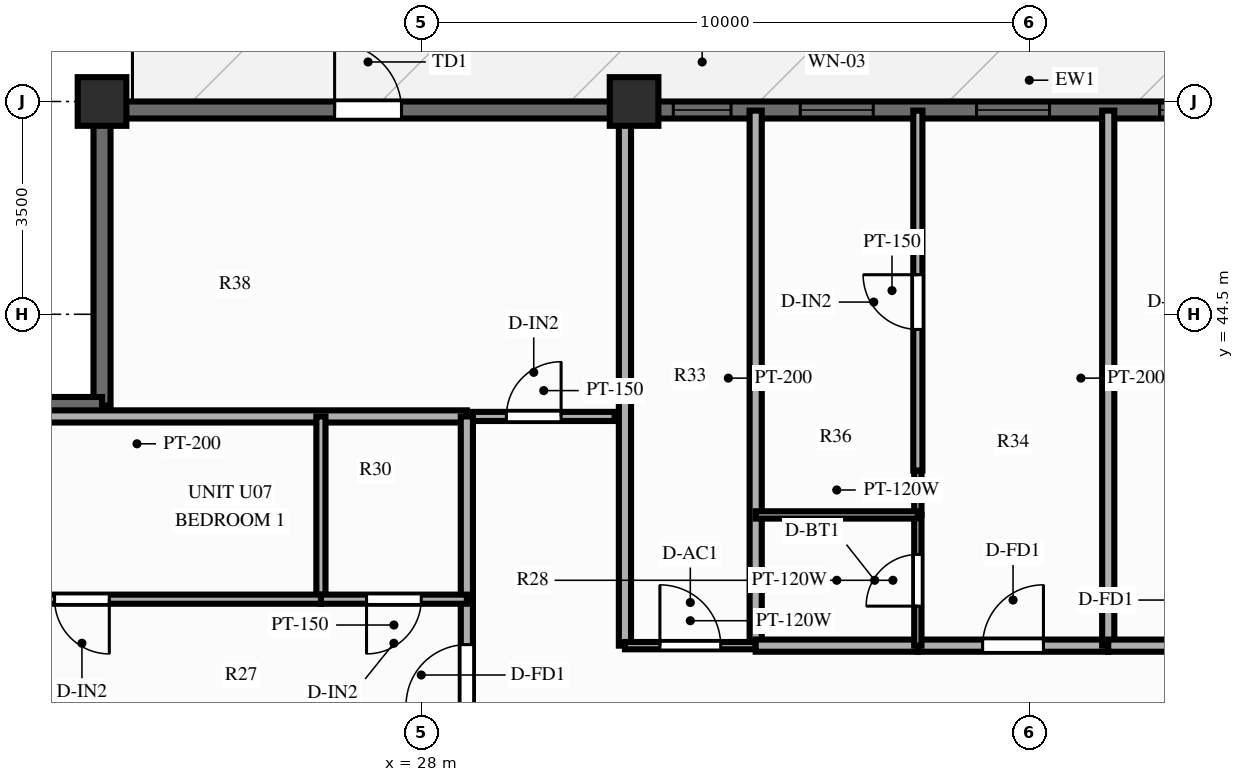
"""IFC4 building model, lengths in metres.
Left out: names, types, materials, properties, quantities, classifications, styles, units other than length and angle.
Written with IfcOpenShell. Run it as: python <this file> out.ifc"""

import sys

from ifc_helpers import new_model, si_unit, direction, frame, frame_2d, origin, origin_2d, place, context, subcontext, project, spatial, rectangle, extrude, source, transform, mapped, element, fill, save


model = new_model("IFC4")
c1 = context("Model", 3, precision=1e-05, world=origin(), true_north=direction((0.0, 1.0)))
c2 = subcontext(c1, "Body", "Model", "MODEL_VIEW")
j1 = project(units=[si_unit("LENGTHUNIT", "METRE"), si_unit("PLANEANGLEUNIT", "RADIAN")], contexts=[c1])
p1 = place(None, origin())
s1 = spatial("IfcSite", under=j1, at=p1, CompositionType="ELEMENT")
p2 = place(p1, origin())
s2 = spatial("IfcBuilding", under=s1, at=p2, CompositionType="ELEMENT")
p3 = place(p2, frame((0.0, 0.0, 189.7)))
s3 = spatial("IfcBuildingStorey", under=s2, at=p3, CompositionType="ELEMENT", Elevation=189.7)
m1 = source(origin(), c2, "Body", "SweptSolid", [
    extrude(rectangle(XDim=0.8, YDim=0.8, at=origin_2d()), origin(), (0.0, 0.0, 1.0), 3.0),
])
for number, where, z_axis, x_axis in (
    (1, (31.5, 48.0, 0.0), (0.0, 0.0, 1.0), (1.0, 0.0, 0.0)),
    (2, (22.75, 48.0, 0.0), (0.0, 0.0, 1.0), (1.0, 0.0, 0.0)),
):
    element("IfcColumn", number, at=place(p3, frame(where, z_axis=z_axis, x_axis=x_axis)), inside=s3, PredefinedType="COLUMN", context=c2, shape_type="MappedRepresentation", body=[
        mapped(m1, transform((0.0, 0.0, 0.0), scale=1.0)),
    ])
p4 = place(p3, frame((22.75, 47.86, 0.0), z_axis=(0.0, 0.0, 1.0), x_axis=(1.0, 0.0, 0.0)))
e3 = element("IfcWall", 3, at=p4, inside=s3, PredefinedType="SOLIDWALL", context=c2, shape_type="SweptSolid", body=[
    extrude(rectangle(XDim=30.5, YDim=0.28, at=frame_2d((15.25, 0.0))), origin(), (0.0, 0.0, 1.0), 2.28),
])
p5 = place(p4, frame((3.825, 0.0, 0.0)))
e4 = element("IfcOpeningElement", 4, at=p5, cuts=e3, PredefinedType="OPENING", context=c2, shape_type="SweptSolid", body=[
    extrude(rectangle(XDim=1.1, YDim=2.15, at=frame_2d((0.55, 1.075))), frame((0.0, 0.152, 0.0), z_axis=(0.0, -1.0, 0.0), x_axis=(1.0, 0.0, 0.0)), (0.0, 0.0, 1.0), 0.304),
])
p6 = place(p4, frame((9.395, 0.0, 0.25)))
e5 = element("IfcOpeningElement", 5, at=p6, cuts=e3, PredefinedType="OPENING", context=c2, shape_type="SweptSolid", body=[
    extrude(rectangle(XDim=0.95, YDim=1.5, at=frame_2d((0.475, 0.75))), frame((0.0, 0.152, 0.0), z_axis=(0.0, -1.0, 0.0), x_axis=(1.0, 0.0, 0.0)), (0.0, 0.0, 1.0), 0.304),
])
p7 = place(p4, frame((11.483, 0.0, 0.25)))
e6 = element("IfcOpeningElement", 6, at=p7, cuts=e3, PredefinedType="OPENING", context=c2, shape_type="SweptSolid", body=[
    extrude(rectangle(XDim=1.2, YDim=1.5, at=frame_2d((0.6, 0.75))), frame((0.0, 0.152, 0.0), z_axis=(0.0, -1.0, 0.0), x_axis=(1.0, 0.0, 0.0)), (0.0, 0.0, 1.0), 0.304),
])
p8 = place(p4, frame((14.383, 0.0, 0.25)))
e7 = element("IfcOpeningElement", 7, at=p8, cuts=e3, PredefinedType="OPENING", context=c2, shape_type="SweptSolid", body=[
    extrude(rectangle(XDim=1.2, YDim=1.5, at=frame_2d((0.6, 0.75))), frame((0.0, 0.152, 0.0), z_axis=(0.0, -1.0, 0.0), x_axis=(1.0, 0.0, 0.0)), (0.0, 0.0, 1.0), 0.304),
])
p9 = place(p4, frame((17.393, 0.0, 0.25)))
e8 = element("IfcOpeningElement", 8, at=p9, cuts=e3, PredefinedType="OPENING", context=c2, shape_type="SweptSolid", body=[
    extrude(rectangle(XDim=1.2, YDim=1.5, at=frame_2d((0.6, 0.75))), frame((0.0, 0.152, 0.0), z_axis=(0.0, -1.0, 0.0), x_axis=(1.0, 0.0, 0.0)), (0.0, 0.0, 1.0), 0.304),
])
p10 = place(p4, frame((19.874, 0.0, 0.25)))
e9 = element("IfcOpeningElement", 9, at=p10, cuts=e3, PredefinedType="OPENING", context=c2, shape_type="SweptSolid", body=[
    extrude(rectangle(XDim=1.2, YDim=1.5, at=frame_2d((0.6, 0.75))), frame((0.0, 0.152, 0.0), z_axis=(0.0, -1.0, 0.0), x_axis=(1.0, 0.0, 0.0)), (0.0, 0.0, 1.0), 0.304),
])
p11 = place(p4, frame((25.525, 0.0, 0.25)))
e10 = element("IfcOpeningElement", 10, at=p11, cuts=e3, PredefinedType="OPENING", context=c2, shape_type="SweptSolid", body=[
    extrude(rectangle(XDim=1.2, YDim=1.5, at=frame_2d((0.6, 0.75))), frame((0.0, 0.152, 0.0), z_axis=(0.0, -1.0, 0.0), x_axis=(1.0, 0.0, 0.0)), (0.0, 0.0, 1.0), 0.304),
])
for number, where, z_axis, x_axis in (
    (11, (22.75, 43.0, 0.0), (0.0, 0.0, 1.0), (0.0, 1.0, 0.0)),
    (12, (17.83, 43.0, 0.0), (0.0, 0.0, 1.0), (1.0, 0.0, 0.0)),
):
    element("IfcWall", number, at=place(p3, frame(where, z_axis=z_axis, x_axis=x_axis)), inside=s3, PredefinedType="SOLIDWALL", context=c2, shape_type="SweptSolid", body=[
        extrude(rectangle(XDim=4.92, YDim=0.28, at=frame_2d((2.46, 0.0))), origin(), (0.0, 0.0, 1.0), 2.28),
    ])
p12 = place(p3, frame((28.85, 42.82, 0.0), z_axis=(0.0, 0.0, 1.0), x_axis=(1.0, 0.0, 0.0)))
e13 = element("IfcWall", 13, at=p12, inside=s3, PredefinedType="PARTITIONING", context=c2, shape_type="SweptSolid", body=[
    extrude(rectangle(XDim=2.33, YDim=0.15, at=frame_2d((1.165, 0.0))), origin(), (0.0, 0.0, 1.0), 2.79),
])
p13 = place(p12, frame((0.55, 0.0, 0.0)))
e14 = element("IfcOpeningElement", 14, at=p13, cuts=e13, PredefinedType="OPENING", context=c2, shape_type="SweptSolid", body=[
    extrude(rectangle(XDim=0.9, YDim=2.1, at=frame_2d((0.45, 1.05))), frame((0.0, 0.087, 0.0), z_axis=(0.0, -1.0, 0.0), x_axis=(1.0, 0.0, 0.0)), (0.0, 0.0, 1.0), 0.174),
])
p14 = place(p3, frame((31.35, 39.05, 0.0), z_axis=(0.0, 0.0, 1.0), x_axis=(0.0, 1.0, 0.0)))
e15 = element("IfcWall", 15, at=p14, inside=s3, PredefinedType="PARTITIONING", context=c2, shape_type="SweptSolid", body=[
    extrude(rectangle(XDim=8.8, YDim=0.2, at=frame_2d((4.4, 0.0))), origin(), (0.0, 0.0, 1.0), 2.39),
])
p15 = place(p3, frame((33.5, 39.05, 0.0), z_axis=(0.0, 0.0, 1.0), x_axis=(0.0, 1.0, 0.0)))
e16 = element("IfcWall", 16, at=p15, inside=s3, PredefinedType="PARTITIONING", context=c2, shape_type="SweptSolid", body=[
    extrude(rectangle(XDim=8.8, YDim=0.2, at=frame_2d((4.4, 0.0))), origin(), (0.0, 0.0, 1.0), 2.79),
])
p16 = place(p3, frame((31.35, 39.05, 0.0), z_axis=(0.0, 0.0, 1.0), x_axis=(1.0, 0.0, 0.0)))
e17 = element("IfcWall", 17, at=p16, inside=s3, PredefinedType="PARTITIONING", context=c2, shape_type="SweptSolid", body=[
    extrude(rectangle(XDim=2.15, YDim=0.12, at=frame_2d((1.075, 0.0))), origin(), (0.0, 0.0, 1.0), 2.79),
])
p17 = place(p16, frame((0.575, 0.0, 0.0)))
e18 = element("IfcOpeningElement", 18, at=p17, cuts=e17, PredefinedType="OPENING", context=c2, shape_type="SweptSolid", body=[
    extrude(rectangle(XDim=1.0, YDim=2.1, at=frame_2d((0.5, 1.05))), frame((0.0, 0.072, 0.0), z_axis=(0.0, -1.0, 0.0), x_axis=(1.0, 0.0, 0.0)), (0.0, 0.0, 1.0), 0.144),
])
p18 = place(p3, frame((33.5, 39.05, 0.0), z_axis=(0.0, 0.0, 1.0), x_axis=(1.0, 0.0, 0.0)))
e19 = element("IfcWall", 19, at=p18, inside=s3, PredefinedType="PARTITIONING", context=c2, shape_type="SweptSolid", body=[
    extrude(rectangle(XDim=2.667, YDim=0.2, at=frame_2d((1.333, 0.0))), origin(), (0.0, 0.0, 1.0), 2.79),
])
p19 = place(p3, frame((36.167, 39.05, 0.0), z_axis=(0.0, 0.0, 1.0), x_axis=(1.0, 0.0, 0.0)))
e20 = element("IfcWall", 20, at=p19, inside=s3, PredefinedType="PARTITIONING", context=c2, shape_type="SweptSolid", body=[
    extrude(rectangle(XDim=3.131, YDim=0.2, at=frame_2d((1.565, 0.0))), origin(), (0.0, 0.0, 1.0), 2.79),
])
p20 = place(p19, frame((1.065, 0.0, 0.0)))
e21 = element("IfcOpeningElement", 21, at=p20, cuts=e20, PredefinedType="OPENING", context=c2, shape_type="SweptSolid", body=[
    extrude(rectangle(XDim=1.0, YDim=2.15, at=frame_2d((0.5, 1.075))), frame((0.0, 0.112, 0.0), z_axis=(0.0, -1.0, 0.0), x_axis=(1.0, 0.0, 0.0)), (0.0, 0.0, 1.0), 0.224),
])
p21 = place(p3, frame((36.167, 39.05, 0.0), z_axis=(0.0, 0.0, 1.0), x_axis=(0.0, 1.0, 0.0)))
e22 = element("IfcWall", 22, at=p21, inside=s3, PredefinedType="PARTITIONING", context=c2, shape_type="SweptSolid", body=[
    extrude(rectangle(XDim=2.15, YDim=0.12, at=frame_2d((1.075, 0.0))), origin(), (0.0, 0.0, 1.0), 2.79),
])
p22 = place(p21, frame((0.65, 0.0, 0.0)))
e23 = element("IfcOpeningElement", 23, at=p22, cuts=e22, PredefinedType="OPENING", context=c2, shape_type="SweptSolid", body=[
    extrude(rectangle(XDim=0.85, YDim=2.05, at=frame_2d((0.425, 1.025))), frame((0.0, 0.072, 0.0), z_axis=(0.0, -1.0, 0.0), x_axis=(1.0, 0.0, 0.0)), (0.0, 0.0, 1.0), 0.144),
])
p23 = place(p3, frame((36.167, 41.2, 0.0), z_axis=(0.0, 0.0, 1.0), x_axis=(0.0, 1.0, 0.0)))
e24 = element("IfcWall", 24, at=p23, inside=s3, PredefinedType="PARTITIONING", context=c2, shape_type="SweptSolid", body=[
    extrude(rectangle(XDim=0.73, YDim=0.12, at=frame_2d((0.365, 0.0))), origin(), (0.0, 0.0, 1.0), 2.79),
])
p24 = place(p3, frame((33.5, 41.2, 0.0), z_axis=(0.0, 0.0, 1.0), x_axis=(1.0, 0.0, 0.0)))
e25 = element("IfcWall", 25, at=p24, inside=s3, PredefinedType="PARTITIONING", context=c2, shape_type="SweptSolid", body=[
    extrude(rectangle(XDim=2.667, YDim=0.12, at=frame_2d((1.333, 0.0))), origin(), (0.0, 0.0, 1.0), 2.79),
])
p25 = place(p3, frame((36.167, 41.93, 0.0), z_axis=(0.0, 0.0, 1.0), x_axis=(0.0, 1.0, 0.0)))
e26 = element("IfcWall", 26, at=p25, inside=s3, PredefinedType="PARTITIONING", context=c2, shape_type="SweptSolid", body=[
    extrude(rectangle(XDim=5.92, YDim=0.15, at=frame_2d((2.96, 0.0))), origin(), (0.0, 0.0, 1.0), 2.79),
])
p26 = place(p25, frame((2.321, 0.0, 0.0)))
e27 = element("IfcOpeningElement", 27, at=p26, cuts=e26, PredefinedType="OPENING", context=c2, shape_type="SweptSolid", body=[
    extrude(rectangle(XDim=0.9, YDim=2.1, at=frame_2d((0.45, 1.05))), frame((0.0, 0.087, 0.0), z_axis=(0.0, -1.0, 0.0), x_axis=(1.0, 0.0, 0.0)), (0.0, 0.0, 1.0), 0.174),
])
p27 = place(p3, frame((39.298, 39.05, 0.0), z_axis=(0.0, 0.0, 1.0), x_axis=(0.0, 1.0, 0.0)))
e28 = element("IfcWall", 28, at=p27, inside=s3, PredefinedType="PARTITIONING", context=c2, shape_type="SweptSolid", body=[
    extrude(rectangle(XDim=8.8, YDim=0.2, at=frame_2d((4.4, 0.0))), origin(), (0.0, 0.0, 1.0), 2.79),
])
p28 = place(p3, frame((39.298, 39.05, 0.0), z_axis=(0.0, 0.0, 1.0), x_axis=(1.0, 0.0, 0.0)))
e29 = element("IfcWall", 29, at=p28, inside=s3, PredefinedType="PARTITIONING", context=c2, shape_type="SweptSolid", body=[
    extrude(rectangle(XDim=2.89, YDim=0.2, at=frame_2d((1.445, 0.0))), origin(), (0.0, 0.0, 1.0), 2.79),
])
p29 = place(p28, frame((0.945, 0.0, 0.0)))
e30 = element("IfcOpeningElement", 30, at=p29, cuts=e29, PredefinedType="OPENING", context=c2, shape_type="SweptSolid", body=[
    extrude(rectangle(XDim=1.0, YDim=2.15, at=frame_2d((0.5, 1.075))), frame((0.0, 0.112, 0.0), z_axis=(0.0, -1.0, 0.0), x_axis=(1.0, 0.0, 0.0)), (0.0, 0.0, 1.0), 0.224),
])
p30 = place(p3, frame((28.75, 42.82, 0.0), z_axis=(0.0, 0.0, 1.0), x_axis=(-1.0, 0.0, 0.0)))
e31 = element("IfcWall", 31, at=p30, inside=s3, PredefinedType="PARTITIONING", context=c2, shape_type="SweptSolid", body=[
    extrude(rectangle(XDim=10.85, YDim=0.2, at=frame_2d((5.425, 0.0))), origin(), (0.0, 0.0, 1.0), 2.79),
])
p31 = place(p3, frame((28.75, 37.32, 0.0), z_axis=(0.0, 0.0, 1.0), x_axis=(0.0, 1.0, 0.0)))
e32 = element("IfcWall", 32, at=p31, inside=s3, PredefinedType="PARTITIONING", context=c2, shape_type="SweptSolid", body=[
    extrude(rectangle(XDim=2.494, YDim=0.2, at=frame_2d((1.247, 0.0))), origin(), (0.0, 0.0, 1.0), 2.79),
])
p32 = place(p31, frame((0.747, 0.0, 0.0)))
e33 = element("IfcOpeningElement", 33, at=p32, cuts=e32, PredefinedType="OPENING", context=c2, shape_type="SweptSolid", body=[
    extrude(rectangle(XDim=1.0, YDim=2.15, at=frame_2d((0.5, 1.075))), frame((0.0, 0.112, 0.0), z_axis=(0.0, -1.0, 0.0), x_axis=(1.0, 0.0, 0.0)), (0.0, 0.0, 1.0), 0.224),
])
p33 = place(p3, frame((28.75, 39.814, 0.0), z_axis=(0.0, 0.0, 1.0), x_axis=(0.0, 1.0, 0.0)))
e34 = element("IfcWall", 34, at=p33, inside=s3, PredefinedType="PARTITIONING", context=c2, shape_type="SweptSolid", body=[
    extrude(rectangle(XDim=3.006, YDim=0.2, at=frame_2d((1.503, 0.0))), origin(), (0.0, 0.0, 1.0), 2.79),
])
p34 = place(p3, frame((26.35, 39.814, 0.0), z_axis=(0.0, 0.0, 1.0), x_axis=(0.0, 1.0, 0.0)))
e35 = element("IfcWall", 35, at=p34, inside=s3, PredefinedType="PARTITIONING", context=c2, shape_type="SweptSolid", body=[
    extrude(rectangle(XDim=3.006, YDim=0.15, at=frame_2d((1.503, 0.0))), origin(), (0.0, 0.0, 1.0), 2.79),
])
p35 = place(p3, frame((28.75, 39.814, 0.0), z_axis=(0.0, 0.0, 1.0), x_axis=(-1.0, 0.0, 0.0)))
e36 = element("IfcWall", 36, at=p35, inside=s3, PredefinedType="PARTITIONING", context=c2, shape_type="SweptSolid", body=[
    extrude(rectangle(XDim=2.4, YDim=0.15, at=frame_2d((1.2, 0.0))), origin(), (0.0, 0.0, 1.0), 2.79),
])
p36 = place(p35, frame((0.75, 0.0, 0.0)))
e37 = element("IfcOpeningElement", 37, at=p36, cuts=e36, PredefinedType="OPENING", context=c2, shape_type="SweptSolid", body=[
    extrude(rectangle(XDim=0.9, YDim=2.1, at=frame_2d((0.45, 1.05))), frame((0.0, 0.087, 0.0), z_axis=(0.0, -1.0, 0.0), x_axis=(1.0, 0.0, 0.0)), (0.0, 0.0, 1.0), 0.174),
])
p37 = place(p3, frame((26.35, 39.814, 0.0), z_axis=(0.0, 0.0, 1.0), x_axis=(-1.0, 0.0, 0.0)))
e38 = element("IfcWall", 38, at=p37, inside=s3, PredefinedType="PARTITIONING", context=c2, shape_type="SweptSolid", body=[
    extrude(rectangle(XDim=8.45, YDim=0.15, at=frame_2d((4.225, 0.0))), origin(), (0.0, 0.0, 1.0), 2.79),
])
p38 = place(p37, frame((3.48, 0.0, 0.0)))
e39 = element("IfcOpeningElement", 39, at=p38, cuts=e38, PredefinedType="OPENING", context=c2, shape_type="SweptSolid", body=[
    extrude(rectangle(XDim=0.9, YDim=2.1, at=frame_2d((0.45, 1.05))), frame((0.0, 0.087, 0.0), z_axis=(0.0, -1.0, 0.0), x_axis=(1.0, 0.0, 0.0)), (0.0, 0.0, 1.0), 0.174),
])
m2 = source(origin(), c2, "Body", "SweptSolid", [
    extrude(rectangle(XDim=1.1, YDim=2.15, at=frame_2d((0.55, 1.075))), frame((0.0, 0.025, 0.0), z_axis=(0.0, -1.0, 0.0), x_axis=(1.0, 0.0, 0.0)), (0.0, 0.0, 1.0), 0.05),
])
p39 = place(p5, origin())
e40 = element("IfcDoor", 40, at=p39, inside=s3, OperationType="SINGLE_SWING_LEFT", PredefinedType="DOOR", context=c2, shape_type="MappedRepresentation", body=[
    mapped(m2, transform((0.0, 0.0, 0.0), scale=1.0)),
])
fill(e4, e40)
m3 = source(origin(), c2, "Body", "SweptSolid", [
    extrude(rectangle(XDim=0.95, YDim=1.5, at=frame_2d((0.475, 0.75))), frame((0.0, 0.03, 0.0), z_axis=(0.0, -1.0, 0.0), x_axis=(1.0, 0.0, 0.0)), (0.0, 0.0, 1.0), 0.06),
])
p40 = place(p6, origin())
e41 = element("IfcWindow", 41, at=p40, inside=s3, PartitioningType="SINGLE_PANEL", PredefinedType="WINDOW", context=c2, shape_type="MappedRepresentation", body=[
    mapped(m3, transform((0.0, 0.0, 0.0), scale=1.0)),
])
fill(e5, e41)
m4 = source(origin(), c2, "Body", "SweptSolid", [
    extrude(rectangle(XDim=1.2, YDim=1.5, at=frame_2d((0.6, 0.75))), frame((0.0, 0.03, 0.0), z_axis=(0.0, -1.0, 0.0), x_axis=(1.0, 0.0, 0.0)), (0.0, 0.0, 1.0), 0.06),
])
p41 = place(p7, origin())
e42 = element("IfcWindow", 42, at=p41, inside=s3, PartitioningType="SINGLE_PANEL", PredefinedType="WINDOW", context=c2, shape_type="MappedRepresentation", body=[
    mapped(m4, transform((0.0, 0.0, 0.0), scale=1.0)),
])
fill(e6, e42)
p42 = place(p8, origin())
e43 = element("IfcWindow", 43, at=p42, inside=s3, PartitioningType="SINGLE_PANEL", PredefinedType="WINDOW", context=c2, shape_type="MappedRepresentation", body=[
    mapped(m4, transform((0.0, 0.0, 0.0), scale=1.0)),
])
fill(e7, e43)
p43 = place(p9, origin())
e44 = element("IfcWindow", 44, at=p43, inside=s3, PartitioningType="SINGLE_PANEL", PredefinedType="WINDOW", context=c2, shape_type="MappedRepresentation", body=[
    mapped(m4, transform((0.0, 0.0, 0.0), scale=1.0)),
])
fill(e8, e44)
m5 = source(origin(), c2, "Body", "SweptSolid", [
    extrude(rectangle(XDim=0.9, YDim=2.1, at=frame_2d((0.45, 1.05))), frame((0.0, 0.025, 0.0), z_axis=(0.0, -1.0, 0.0), x_axis=(1.0, 0.0, 0.0)), (0.0, 0.0, 1.0), 0.05),
])
p44 = place(p13, origin())
e45 = element("IfcDoor", 45, at=p44, inside=s3, OperationType="SINGLE_SWING_RIGHT", PredefinedType="DOOR", context=c2, shape_type="MappedRepresentation", body=[
    mapped(m5, transform((0.0, 0.0, 0.0), scale=1.0)),
])
fill(e14, e45)
m6 = source(origin(), c2, "Body", "SweptSolid", [
    extrude(rectangle(XDim=1.0, YDim=2.1, at=frame_2d((0.5, 1.05))), frame((0.0, 0.025, 0.0), z_axis=(0.0, -1.0, 0.0), x_axis=(1.0, 0.0, 0.0)), (0.0, 0.0, 1.0), 0.05),
])
p45 = place(p17, origin())
e46 = element("IfcDoor", 46, at=p45, inside=s3, OperationType="SINGLE_SWING_LEFT", PredefinedType="DOOR", context=c2, shape_type="MappedRepresentation", body=[
    mapped(m6, transform((0.0, 0.0, 0.0), scale=1.0)),
])
fill(e18, e46)
m7 = source(origin(), c2, "Body", "SweptSolid", [
    extrude(rectangle(XDim=1.0, YDim=2.15, at=frame_2d((0.5, 1.075))), frame((0.0, 0.025, 0.0), z_axis=(0.0, -1.0, 0.0), x_axis=(1.0, 0.0, 0.0)), (0.0, 0.0, 1.0), 0.05),
])
p46 = place(p20, origin())
e47 = element("IfcDoor", 47, at=p46, inside=s3, OperationType="SINGLE_SWING_RIGHT", PredefinedType="DOOR", context=c2, shape_type="MappedRepresentation", body=[
    mapped(m7, transform((0.0, 0.0, 0.0), scale=1.0)),
])
fill(e21, e47)
m8 = source(origin(), c2, "Body", "SweptSolid", [
    extrude(rectangle(XDim=0.85, YDim=2.05, at=frame_2d((0.425, 1.025))), frame((0.0, 0.025, 0.0), z_axis=(0.0, -1.0, 0.0), x_axis=(1.0, 0.0, 0.0)), (0.0, 0.0, 1.0), 0.05),
])
p47 = place(p22, origin())
e48 = element("IfcDoor", 48, at=p47, inside=s3, OperationType="SINGLE_SWING_LEFT", PredefinedType="DOOR", context=c2, shape_type="MappedRepresentation", body=[
    mapped(m8, transform((0.0, 0.0, 0.0), scale=1.0)),
])
fill(e23, e48)
p48 = place(p26, origin())
e49 = element("IfcDoor", 49, at=p48, inside=s3, OperationType="SINGLE_SWING_RIGHT", PredefinedType="DOOR", context=c2, shape_type="MappedRepresentation", body=[
    mapped(m5, transform((0.0, 0.0, 0.0), scale=1.0)),
])
fill(e27, e49)
p49 = place(p32, origin())
e50 = element("IfcDoor", 50, at=p49, inside=s3, OperationType="SINGLE_SWING_LEFT", PredefinedType="DOOR", context=c2, shape_type="MappedRepresentation", body=[
    mapped(m7, transform((0.0, 0.0, 0.0), scale=1.0)),
])
fill(e33, e50)
p50 = place(p36, origin())
e51 = element("IfcDoor", 51, at=p50, inside=s3, OperationType="SINGLE_SWING_RIGHT", PredefinedType="DOOR", context=c2, shape_type="MappedRepresentation", body=[
    mapped(m5, transform((0.0, 0.0, 0.0), scale=1.0)),
])
fill(e37, e51)
p51 = place(p38, origin())
e52 = element("IfcDoor", 52, at=p51, inside=s3, OperationType="SINGLE_SWING_LEFT", PredefinedType="DOOR", context=c2, shape_type="MappedRepresentation", body=[
    mapped(m5, transform((0.0, 0.0, 0.0), scale=1.0)),
])
fill(e39, e52)
save(model, sys.argv[1])
